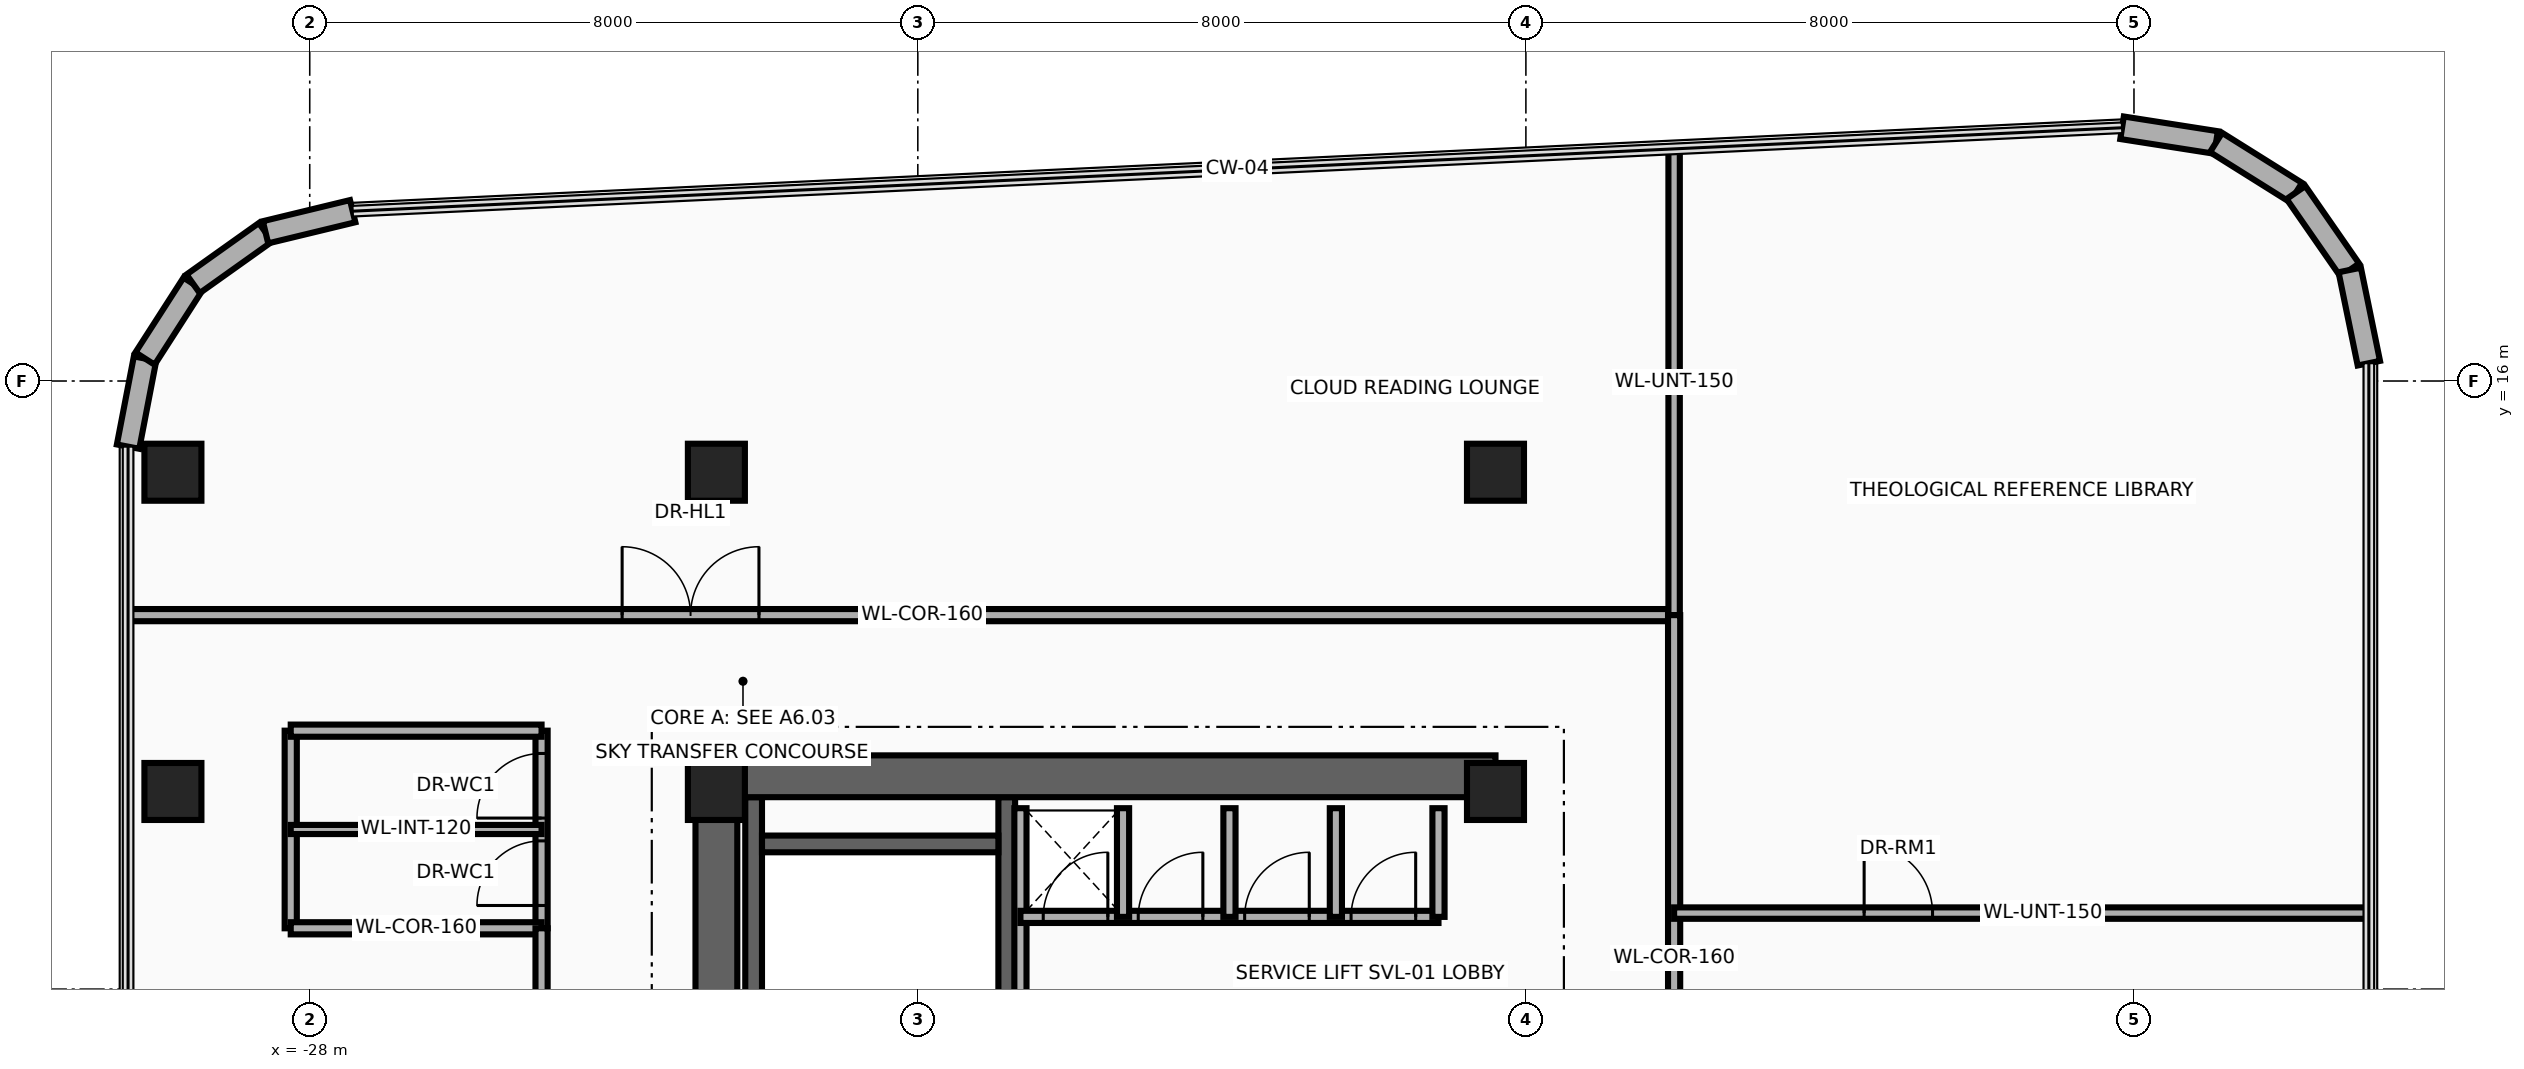
"""IFC4 building model, lengths in metres.
Left out: names, types, materials, properties, quantities, classifications, styles, units other than length and angle.
Written with IfcOpenShell. Run it as: python <this file> out.ifc"""

import sys

from ifc_helpers import new_model, si_unit, direction, frame, frame_2d, origin, origin_2d, place, context, subcontext, project, spatial, rectangle, extrude, source, transform, mapped, element, fill, save


model = new_model("IFC4")
c1 = context("Model", 3, precision=1e-05, world=origin(), true_north=direction((0.0, 1.0)))
c2 = subcontext(c1, "Body", "Model", "MODEL_VIEW")
j1 = project(units=[si_unit("LENGTHUNIT", "METRE"), si_unit("PLANEANGLEUNIT", "RADIAN")], contexts=[c1])
p1 = place(None, origin())
s1 = spatial("IfcSite", under=j1, at=p1, CompositionType="ELEMENT")
p2 = place(p1, origin())
s2 = spatial("IfcBuilding", under=s1, at=p2, CompositionType="ELEMENT")
p3 = place(p2, frame((0.0, 0.0, 287.0)))
s3 = spatial("IfcBuildingStorey", under=s2, at=p3, CompositionType="ELEMENT", Elevation=287.0)
for number, where, z_axis, x_axis in (
    (1, (-22.16, 1.78, 0.0), (0.0, 0.0, 1.0), (0.0, 1.0, 0.0)),
    (2, (-18.83, 1.78, 0.0), (0.0, 0.0, 1.0), (0.0, 1.0, 0.0)),
):
    element("IfcWall", number, at=place(p3, frame(where, z_axis=z_axis, x_axis=x_axis)), inside=s3, PredefinedType="SHEAR", context=c2, shape_type="SweptSolid", body=[
        extrude(rectangle(XDim=8.745, YDim=0.22, at=frame_2d((4.373, 0.0))), origin(), (0.0, 0.0, 1.0), 3.36),
    ])
p4 = place(p3, frame((-22.05, 9.91, 0.0), z_axis=(0.0, 0.0, 1.0), x_axis=(1.0, 0.0, 0.0)))
e3 = element("IfcWall", 3, at=p4, inside=s3, PredefinedType="SHEAR", context=c2, shape_type="SweptSolid", body=[
    extrude(rectangle(XDim=3.11, YDim=0.22, at=frame_2d((1.555, 0.0))), origin(), (0.0, 0.0, 1.0), 3.36),
])
p5 = place(p3, frame((-22.65, -11.075, 0.0), z_axis=(0.0, 0.0, 1.0), x_axis=(0.0, 1.0, 0.0)))
e4 = element("IfcWall", 4, at=p5, inside=s3, PredefinedType="SHEAR", context=c2, shape_type="SweptSolid", body=[
    extrude(rectangle(XDim=22.15, YDim=0.55, at=frame_2d((11.075, 0.0))), origin(), (0.0, 0.0, 1.0), 3.36),
])
p6 = place(p3, frame((-22.65, 10.8, 0.0), z_axis=(0.0, 0.0, 1.0), x_axis=(1.0, 0.0, 0.0)))
e5 = element("IfcWall", 5, at=p6, inside=s3, PredefinedType="SHEAR", context=c2, shape_type="SweptSolid", body=[
    extrude(rectangle(XDim=10.25, YDim=0.55, at=frame_2d((5.125, 0.0))), origin(), (0.0, 0.0, 1.0), 3.36),
])
m1 = source(origin(), c2, "Body", "SweptSolid", [
    extrude(rectangle(XDim=0.75, YDim=0.75, at=origin_2d()), origin(), (0.0, 0.0, 1.0), 3.6),
])
for number, where, z_axis, x_axis in (
    (6, (-29.8, 10.6, 0.0), (0.0, 0.0, 1.0), (1.0, 0.0, 0.0)),
    (7, (-22.65, 10.6, 0.0), (0.0, 0.0, 1.0), (1.0, 0.0, 0.0)),
    (8, (-12.4, 10.6, 0.0), (0.0, 0.0, 1.0), (1.0, 0.0, 0.0)),
    (9, (-29.8, 14.8, 0.0), (0.0, 0.0, 1.0), (1.0, 0.0, 0.0)),
    (10, (-22.65, 14.8, 0.0), (0.0, 0.0, 1.0), (1.0, 0.0, 0.0)),
    (11, (-12.4, 14.8, 0.0), (0.0, 0.0, 1.0), (1.0, 0.0, 0.0)),
):
    element("IfcColumn", number, at=place(p3, frame(where, z_axis=z_axis, x_axis=x_axis)), inside=s3, PredefinedType="COLUMN", context=c2, shape_type="MappedRepresentation", body=[
        mapped(m1, transform((0.0, 0.0, 0.0), x_axis=(1.0, 0.0, 0.0), y_axis=(0.0, 1.0, 0.0), z_axis=(0.0, 0.0, 1.0), scale=1.0)),
    ])
p7 = place(p3, frame((-30.39, 15.137, 0.0), z_axis=(0.0, 0.0, 1.0), x_axis=(0.189307792679, 0.981917796779, 0.0)))
e12 = element("IfcWall", 12, at=p7, inside=s3, PredefinedType="SOLIDWALL", context=c2, shape_type="SweptSolid", body=[
    extrude(rectangle(XDim=1.18, YDim=0.3, at=frame_2d((0.59, 0.0))), origin(), (0.0, 0.0, 1.0), 3.36),
])
p8 = place(p3, frame((-30.167, 16.295, 0.0), z_axis=(0.0, 0.0, 1.0), x_axis=(0.540842020947, 0.841124193195, 0.0)))
e13 = element("IfcWall", 13, at=p8, inside=s3, PredefinedType="SOLIDWALL", context=c2, shape_type="SweptSolid", body=[
    extrude(rectangle(XDim=1.169, YDim=0.3, at=frame_2d((0.584, 0.0))), origin(), (0.0, 0.0, 1.0), 3.36),
])
p9 = place(p3, frame((-29.534, 17.279, 0.0), z_axis=(0.0, 0.0, 1.0), x_axis=(0.81466371606, 0.579933642527, 0.0)))
e14 = element("IfcWall", 14, at=p9, inside=s3, PredefinedType="SOLIDWALL", context=c2, shape_type="SweptSolid", body=[
    extrude(rectangle(XDim=1.169, YDim=0.3, at=frame_2d((0.584, 0.0))), origin(), (0.0, 0.0, 1.0), 3.36),
])
p10 = place(p3, frame((-28.582, 17.957, 0.0), z_axis=(0.0, 0.0, 1.0), x_axis=(0.971929016595, 0.235274279725, 0.0)))
e15 = element("IfcWall", 15, at=p10, inside=s3, PredefinedType="SOLIDWALL", context=c2, shape_type="SweptSolid", body=[
    extrude(rectangle(XDim=1.18, YDim=0.3, at=frame_2d((0.59, 0.0))), origin(), (0.0, 0.0, 1.0), 3.36),
])
p11 = place(p3, frame((-4.157, 19.332, 0.0), z_axis=(0.0, 0.0, 1.0), x_axis=(0.987969236552, -0.15465053387, 0.0)))
e16 = element("IfcWall", 16, at=p11, inside=s3, PredefinedType="SOLIDWALL", context=c2, shape_type="SweptSolid", body=[
    extrude(rectangle(XDim=1.252, YDim=0.3, at=frame_2d((0.626, 0.0))), origin(), (0.0, 0.0, 1.0), 3.36),
])
for number, where, z_axis, x_axis in (
    (17, (-2.92, 19.138, 0.0), (0.0, 0.0, 1.0), (0.847, -0.531, 0.0)),
    (18, (-1.869, 18.48, 0.0), (0.0, 0.0, 1.0), (0.57, -0.822, 0.0)),
):
    element("IfcWall", number, at=place(p3, frame(where, z_axis=z_axis, x_axis=x_axis)), inside=s3, PredefinedType="SOLIDWALL", context=c2, shape_type="SweptSolid", body=[
        extrude(rectangle(XDim=1.24, YDim=0.3, at=frame_2d((0.62, 0.0))), origin(), (0.0, 0.0, 1.0), 3.36),
    ])
p12 = place(p3, frame((-1.161, 17.461, 0.0), z_axis=(0.0, 0.0, 1.0), x_axis=(0.20087696073, -0.979616479367, 0.0)))
e19 = element("IfcWall", 19, at=p12, inside=s3, PredefinedType="SOLIDWALL", context=c2, shape_type="SweptSolid", body=[
    extrude(rectangle(XDim=1.252, YDim=0.3, at=frame_2d((0.626, 0.0))), origin(), (0.0, 0.0, 1.0), 3.36),
])
p13 = place(p3, frame((-18.65, 7.45, 0.0), z_axis=(0.0, 0.0, 1.0), x_axis=(0.0, 1.0, 0.0)))
e20 = element("IfcWall", 20, at=p13, inside=s3, PredefinedType="PARTITIONING", context=c2, shape_type="SweptSolid", body=[
    extrude(rectangle(XDim=2.93, YDim=0.16, at=frame_2d((1.465, 0.0))), origin(), (0.0, 0.0, 1.0), 3.36),
])
p14 = place(p3, frame((-18.65, 8.95, 0.0), z_axis=(0.0, 0.0, 1.0), x_axis=(1.0, 0.0, 0.0)))
e21 = element("IfcWall", 21, at=p14, inside=s3, PredefinedType="PARTITIONING", context=c2, shape_type="SweptSolid", body=[
    extrude(rectangle(XDim=5.5, YDim=0.16, at=frame_2d((2.75, 0.0))), origin(), (0.0, 0.0, 1.0), 3.36),
])
p15 = place(p14, frame((0.3, 0.0, 0.0)))
e22 = element("IfcOpeningElement", 22, at=p15, cuts=e21, PredefinedType="OPENING", context=c2, shape_type="SweptSolid", body=[
    extrude(rectangle(XDim=0.85, YDim=2.05, at=frame_2d((0.425, 1.025))), frame((0.0, 0.095, 0.0), z_axis=(0.0, -1.0, 0.0), x_axis=(1.0, 0.0, 0.0)), (0.0, 0.0, 1.0), 0.19),
])
p16 = place(p14, frame((1.55, 0.0, 0.0)))
e23 = element("IfcOpeningElement", 23, at=p16, cuts=e21, PredefinedType="OPENING", context=c2, shape_type="SweptSolid", body=[
    extrude(rectangle(XDim=0.85, YDim=2.05, at=frame_2d((0.425, 1.025))), frame((0.0, 0.095, 0.0), z_axis=(0.0, -1.0, 0.0), x_axis=(1.0, 0.0, 0.0)), (0.0, 0.0, 1.0), 0.19),
])
p17 = place(p14, frame((2.95, 0.0, 0.0)))
e24 = element("IfcOpeningElement", 24, at=p17, cuts=e21, PredefinedType="OPENING", context=c2, shape_type="SweptSolid", body=[
    extrude(rectangle(XDim=0.85, YDim=2.05, at=frame_2d((0.425, 1.025))), frame((0.0, 0.095, 0.0), z_axis=(0.0, -1.0, 0.0), x_axis=(1.0, 0.0, 0.0)), (0.0, 0.0, 1.0), 0.19),
])
p18 = place(p14, frame((4.35, 0.0, 0.0)))
e25 = element("IfcOpeningElement", 25, at=p18, cuts=e21, PredefinedType="OPENING", context=c2, shape_type="SweptSolid", body=[
    extrude(rectangle(XDim=0.85, YDim=2.05, at=frame_2d((0.425, 1.025))), frame((0.0, 0.095, 0.0), z_axis=(0.0, -1.0, 0.0), x_axis=(1.0, 0.0, 0.0)), (0.0, 0.0, 1.0), 0.19),
])
for number, where, z_axis, x_axis in (
    (26, (-13.15, 8.95, 0.0), (0.0, 0.0, 1.0), (0.0, 1.0, 0.0)),
    (27, (-17.3, 8.95, 0.0), (0.0, 0.0, 1.0), (0.0, 1.0, 0.0)),
    (28, (-15.9, 8.95, 0.0), (0.0, 0.0, 1.0), (0.0, 1.0, 0.0)),
    (29, (-14.5, 8.95, 0.0), (0.0, 0.0, 1.0), (0.0, 1.0, 0.0)),
):
    element("IfcWall", number, at=place(p3, frame(where, z_axis=z_axis, x_axis=x_axis)), inside=s3, PredefinedType="PARTITIONING", context=c2, shape_type="SweptSolid", body=[
        extrude(rectangle(XDim=1.43, YDim=0.16, at=frame_2d((0.715, 0.0))), origin(), (0.0, 0.0, 1.0), 3.36),
    ])
p19 = place(p3, frame((-28.25, 8.8, 0.0), z_axis=(0.0, 0.0, 1.0), x_axis=(0.0, 1.0, 0.0)))
e30 = element("IfcWall", 30, at=p19, inside=s3, PredefinedType="PARTITIONING", context=c2, shape_type="SweptSolid", body=[
    extrude(rectangle(XDim=2.6, YDim=0.16, at=frame_2d((1.3, 0.0))), origin(), (0.0, 0.0, 1.0), 2.723),
])
p20 = place(p3, frame((-24.95, 8.8, 0.0), z_axis=(0.0, 0.0, 1.0), x_axis=(0.0, 1.0, 0.0)))
e31 = element("IfcWall", 31, at=p20, inside=s3, PredefinedType="PARTITIONING", context=c2, shape_type="SweptSolid", body=[
    extrude(rectangle(XDim=2.6, YDim=0.16, at=frame_2d((1.3, 0.0))), origin(), (0.0, 0.0, 1.0), 2.723),
])
p21 = place(p20, frame((0.3, 0.0, 0.0)))
e32 = element("IfcOpeningElement", 32, at=p21, cuts=e31, PredefinedType="OPENING", context=c2, shape_type="SweptSolid", body=[
    extrude(rectangle(XDim=0.85, YDim=2.1, at=frame_2d((0.425, 1.05))), frame((0.0, 0.095, 0.0), z_axis=(0.0, -1.0, 0.0), x_axis=(1.0, 0.0, 0.0)), (0.0, 0.0, 1.0), 0.19),
])
p22 = place(p20, frame((1.45, 0.0, 0.0)))
e33 = element("IfcOpeningElement", 33, at=p22, cuts=e31, PredefinedType="OPENING", context=c2, shape_type="SweptSolid", body=[
    extrude(rectangle(XDim=0.85, YDim=2.1, at=frame_2d((0.425, 1.05))), frame((0.0, 0.095, 0.0), z_axis=(0.0, -1.0, 0.0), x_axis=(1.0, 0.0, 0.0)), (0.0, 0.0, 1.0), 0.19),
])
for number, where, z_axis, x_axis in (
    (34, (-28.25, 8.8, 0.0), (0.0, 0.0, 1.0), (1.0, 0.0, 0.0)),
    (35, (-28.25, 11.4, 0.0), (0.0, 0.0, 1.0), (1.0, 0.0, 0.0)),
):
    element("IfcWall", number, at=place(p3, frame(where, z_axis=z_axis, x_axis=x_axis)), inside=s3, PredefinedType="PARTITIONING", context=c2, shape_type="SweptSolid", body=[
        extrude(rectangle(XDim=3.3, YDim=0.16, at=frame_2d((1.65, 0.0))), origin(), (0.0, 0.0, 1.0), 3.36),
    ])
p23 = place(p3, frame((-28.25, 10.1, 0.0), z_axis=(0.0, 0.0, 1.0), x_axis=(1.0, 0.0, 0.0)))
e36 = element("IfcWall", 36, at=p23, inside=s3, PredefinedType="PARTITIONING", context=c2, shape_type="SweptSolid", body=[
    extrude(rectangle(XDim=3.3, YDim=0.12, at=frame_2d((1.65, 0.0))), origin(), (0.0, 0.0, 1.0), 3.36),
])
p24 = place(p3, frame((-24.95, -12.92, 0.0), z_axis=(0.0, 0.0, 1.0), x_axis=(0.0, 1.0, 0.0)))
e37 = element("IfcWall", 37, at=p24, inside=s3, PredefinedType="PARTITIONING", context=c2, shape_type="SweptSolid", body=[
    extrude(rectangle(XDim=21.72, YDim=0.16, at=frame_2d((10.86, 0.0))), origin(), (0.0, 0.0, 1.0), 2.723),
])
p25 = place(p24, frame((2.5, 0.0, 0.0)))
e38 = element("IfcOpeningElement", 38, at=p25, cuts=e37, PredefinedType="OPENING", context=c2, shape_type="SweptSolid", body=[
    extrude(rectangle(XDim=1.8, YDim=2.15, at=frame_2d((0.9, 1.075))), frame((0.0, 0.095, 0.0), z_axis=(0.0, -1.0, 0.0), x_axis=(1.0, 0.0, 0.0)), (0.0, 0.0, 1.0), 0.19),
])
p26 = place(p24, frame((11.12, 0.0, 0.0)))
e39 = element("IfcOpeningElement", 39, at=p26, cuts=e37, PredefinedType="OPENING", context=c2, shape_type="SweptSolid", body=[
    extrude(rectangle(XDim=1.8, YDim=2.15, at=frame_2d((0.9, 1.075))), frame((0.0, 0.095, 0.0), z_axis=(0.0, -1.0, 0.0), x_axis=(1.0, 0.0, 0.0)), (0.0, 0.0, 1.0), 0.19),
])
p27 = place(p24, frame((17.92, 0.0, 0.0)))
e40 = element("IfcOpeningElement", 40, at=p27, cuts=e37, PredefinedType="OPENING", context=c2, shape_type="SweptSolid", body=[
    extrude(rectangle(XDim=0.9, YDim=2.1, at=frame_2d((0.45, 1.05))), frame((0.0, 0.095, 0.0), z_axis=(0.0, -1.0, 0.0), x_axis=(1.0, 0.0, 0.0)), (0.0, 0.0, 1.0), 0.19),
])
p28 = place(p3, frame((-30.39, 12.92, 0.0), z_axis=(0.0, 0.0, 1.0), x_axis=(1.0, 0.0, 0.0)))
e41 = element("IfcWall", 41, at=p28, inside=s3, PredefinedType="PARTITIONING", context=c2, shape_type="SweptSolid", body=[
    extrude(rectangle(XDim=20.34, YDim=0.16, at=frame_2d((10.17, 0.0))), origin(), (0.0, 0.0, 1.0), 2.734),
])
p29 = place(p28, frame((6.5, 0.0, 0.0)))
e42 = element("IfcOpeningElement", 42, at=p29, cuts=e41, PredefinedType="OPENING", context=c2, shape_type="SweptSolid", body=[
    extrude(rectangle(XDim=1.8, YDim=2.15, at=frame_2d((0.9, 1.075))), frame((0.0, 0.095, 0.0), z_axis=(0.0, -1.0, 0.0), x_axis=(1.0, 0.0, 0.0)), (0.0, 0.0, 1.0), 0.19),
])
p30 = place(p3, frame((-10.05, 12.92, 0.0), z_axis=(0.0, 0.0, 1.0), x_axis=(0.0, 1.0, 0.0)))
e43 = element("IfcWall", 43, at=p30, inside=s3, PredefinedType="PARTITIONING", context=c2, shape_type="SweptSolid", body=[
    extrude(rectangle(XDim=6.134, YDim=0.15, at=frame_2d((3.067, 0.0))), origin(), (0.0, 0.0, 1.0), 3.36),
])
p31 = place(p3, frame((-10.05, 3.9, 0.0), z_axis=(0.0, 0.0, 1.0), x_axis=(0.0, 1.0, 0.0)))
e44 = element("IfcWall", 44, at=p31, inside=s3, PredefinedType="PARTITIONING", context=c2, shape_type="SweptSolid", body=[
    extrude(rectangle(XDim=9.02, YDim=0.16, at=frame_2d((4.51, 0.0))), origin(), (0.0, 0.0, 1.0), 3.36),
])
p32 = place(p31, frame((1.4, 0.0, 0.0)))
e45 = element("IfcOpeningElement", 45, at=p32, cuts=e44, PredefinedType="OPENING", context=c2, shape_type="SweptSolid", body=[
    extrude(rectangle(XDim=1.8, YDim=2.15, at=frame_2d((0.9, 1.075))), frame((0.0, 0.095, 0.0), z_axis=(0.0, -1.0, 0.0), x_axis=(1.0, 0.0, 0.0)), (0.0, 0.0, 1.0), 0.19),
])
p33 = place(p3, frame((-10.05, 9.0, 0.0), z_axis=(0.0, 0.0, 1.0), x_axis=(1.0, 0.0, 0.0)))
e46 = element("IfcWall", 46, at=p33, inside=s3, PredefinedType="PARTITIONING", context=c2, shape_type="SweptSolid", body=[
    extrude(rectangle(XDim=9.14, YDim=0.15, at=frame_2d((4.57, 0.0))), origin(), (0.0, 0.0, 1.0), 3.36),
])
p34 = place(p33, frame((2.5, 0.0, 0.0)))
e47 = element("IfcOpeningElement", 47, at=p34, cuts=e46, PredefinedType="OPENING", context=c2, shape_type="SweptSolid", body=[
    extrude(rectangle(XDim=0.9, YDim=2.1, at=frame_2d((0.45, 1.05))), frame((0.0, 0.09, 0.0), z_axis=(0.0, -1.0, 0.0), x_axis=(1.0, 0.0, 0.0)), (0.0, 0.0, 1.0), 0.18),
])
p35 = place(p15, origin())
e48 = element("IfcDoor", 48, at=p35, inside=s3, OperationType="SINGLE_SWING_LEFT", PredefinedType="DOOR", context=c2, shape_type="SweptSolid", body=[
    extrude(rectangle(XDim=0.85, YDim=2.05, at=frame_2d((0.425, 1.025))), frame((0.0, 0.025, 0.0), z_axis=(0.0, -1.0, 0.0), x_axis=(1.0, 0.0, 0.0)), (0.0, 0.0, 1.0), 0.05),
])
fill(e22, e48)
p36 = place(p16, origin())
e49 = element("IfcDoor", 49, at=p36, inside=s3, OperationType="SINGLE_SWING_RIGHT", PredefinedType="DOOR", context=c2, shape_type="SweptSolid", body=[
    extrude(rectangle(XDim=0.85, YDim=2.05, at=frame_2d((0.425, 1.025))), frame((0.0, 0.025, 0.0), z_axis=(0.0, -1.0, 0.0), x_axis=(1.0, 0.0, 0.0)), (0.0, 0.0, 1.0), 0.05),
])
fill(e23, e49)
p37 = place(p17, origin())
e50 = element("IfcDoor", 50, at=p37, inside=s3, OperationType="SINGLE_SWING_LEFT", PredefinedType="DOOR", context=c2, shape_type="SweptSolid", body=[
    extrude(rectangle(XDim=0.85, YDim=2.05, at=frame_2d((0.425, 1.025))), frame((0.0, 0.025, 0.0), z_axis=(0.0, -1.0, 0.0), x_axis=(1.0, 0.0, 0.0)), (0.0, 0.0, 1.0), 0.05),
])
fill(e24, e50)
p38 = place(p18, origin())
e51 = element("IfcDoor", 51, at=p38, inside=s3, OperationType="SINGLE_SWING_RIGHT", PredefinedType="DOOR", context=c2, shape_type="SweptSolid", body=[
    extrude(rectangle(XDim=0.85, YDim=2.05, at=frame_2d((0.425, 1.025))), frame((0.0, 0.025, 0.0), z_axis=(0.0, -1.0, 0.0), x_axis=(1.0, 0.0, 0.0)), (0.0, 0.0, 1.0), 0.05),
])
fill(e25, e51)
p39 = place(p21, origin())
e52 = element("IfcDoor", 52, at=p39, inside=s3, OperationType="SINGLE_SWING_LEFT", PredefinedType="DOOR", context=c2, shape_type="SweptSolid", body=[
    extrude(rectangle(XDim=0.85, YDim=2.1, at=frame_2d((0.425, 1.05))), frame((0.0, 0.025, 0.0), z_axis=(0.0, -1.0, 0.0), x_axis=(1.0, 0.0, 0.0)), (0.0, 0.0, 1.0), 0.05),
])
fill(e32, e52)
p40 = place(p22, origin())
e53 = element("IfcDoor", 53, at=p40, inside=s3, OperationType="SINGLE_SWING_RIGHT", PredefinedType="DOOR", context=c2, shape_type="SweptSolid", body=[
    extrude(rectangle(XDim=0.85, YDim=2.1, at=frame_2d((0.425, 1.05))), frame((0.0, 0.025, 0.0), z_axis=(0.0, -1.0, 0.0), x_axis=(1.0, 0.0, 0.0)), (0.0, 0.0, 1.0), 0.05),
])
fill(e33, e53)
p41 = place(p29, origin())
e54 = element("IfcDoor", 54, at=p41, inside=s3, OperationType="DOUBLE_DOOR_SINGLE_SWING", PredefinedType="DOOR", context=c2, shape_type="SweptSolid", body=[
    extrude(rectangle(XDim=1.8, YDim=2.15, at=frame_2d((0.9, 1.075))), frame((0.0, 0.025, 0.0), z_axis=(0.0, -1.0, 0.0), x_axis=(1.0, 0.0, 0.0)), (0.0, 0.0, 1.0), 0.05),
])
fill(e42, e54)
p42 = place(p34, origin())
e55 = element("IfcDoor", 55, at=p42, inside=s3, OperationType="SINGLE_SWING_RIGHT", PredefinedType="DOOR", context=c2, shape_type="SweptSolid", body=[
    extrude(rectangle(XDim=0.9, YDim=2.1, at=frame_2d((0.45, 1.05))), frame((0.0, 0.025, 0.0), z_axis=(0.0, -1.0, 0.0), x_axis=(1.0, 0.0, 0.0)), (0.0, 0.0, 1.0), 0.05),
])
fill(e47, e55)
save(model, sys.argv[1])
